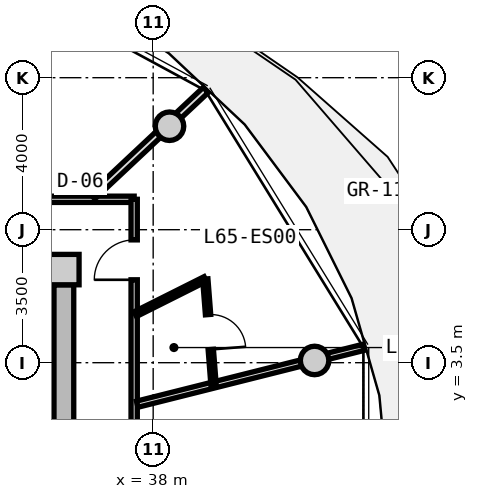
"""IFC4 building model, lengths in metres.
Left out: names, types, materials, properties, quantities, classifications, styles, units other than length and angle.
Written with IfcOpenShell. Run it as: python <this file> out.ifc"""

import sys

from ifc_helpers import new_model, si_unit, direction, frame, frame_2d, origin, origin_2d, place, context, subcontext, project, spatial, rectangle, circle, extrude, source, transform, mapped, element, fill, save


model = new_model("IFC4")
c1 = context("Model", 3, precision=1e-05, world=origin(), true_north=direction((0.0, 1.0)))
c2 = subcontext(c1, "Body", "Model", "MODEL_VIEW")
j1 = project(units=[si_unit("LENGTHUNIT", "METRE"), si_unit("PLANEANGLEUNIT", "RADIAN")], contexts=[c1])
p1 = place(None, origin())
s1 = spatial("IfcSite", under=j1, at=p1, CompositionType="ELEMENT")
p2 = place(p1, origin())
s2 = spatial("IfcBuilding", under=s1, at=p2, CompositionType="ELEMENT")
p3 = place(p2, frame((0.0, 0.0, 210.85)))
s3 = spatial("IfcBuildingStorey", under=s2, at=p3, CompositionType="ELEMENT", Elevation=210.85)
m1 = source(origin(), c2, "Body", "SweptSolid", [
    extrude(rectangle(XDim=0.8, YDim=0.8, at=origin_2d()), origin(), (0.0, 0.0, 1.0), 3.05),
])
p4 = place(p3, frame((35.65, 5.95, 0.0), z_axis=(0.0, 0.0, 1.0), x_axis=(1.0, 0.0, 0.0)))
e1 = element("IfcColumn", 1, at=p4, inside=s3, PredefinedType="COLUMN", context=c2, shape_type="MappedRepresentation", body=[
    mapped(m1, transform((0.0, 0.0, 0.0), x_axis=(1.0, 0.0, 0.0), y_axis=(0.0, 1.0, 0.0), z_axis=(0.0, 0.0, 1.0), scale=1.0)),
])
m2 = source(origin(), c2, "Body", "SweptSolid", [
    extrude(rectangle(XDim=11.1, YDim=0.52, at=frame_2d((5.55, 0.0))), origin(), (0.0, 0.0, 1.0), 2.76),
])
p5 = place(p3, frame((35.65, 5.55, 0.0), z_axis=(0.0, 0.0, 1.0), x_axis=(0.0, -1.0, 0.0)))
e2 = element("IfcWall", 2, at=p5, inside=s3, PredefinedType="SHEAR", context=c2, shape_type="MappedRepresentation", body=[
    mapped(m2, transform((0.0, 0.0, 0.0), x_axis=(1.0, 0.0, 0.0), y_axis=(0.0, 1.0, 0.0), z_axis=(0.0, 0.0, 1.0), scale=1.0)),
])
p6 = place(p5, frame((5.65, 0.0, 0.0)))
e3 = element("IfcOpeningElement", 3, at=p6, cuts=e2, PredefinedType="OPENING", context=c2, shape_type="SweptSolid", body=[
    extrude(rectangle(XDim=1.2, YDim=2.15, at=frame_2d((0.6, 1.075))), frame((0.0, 0.27, 0.0), z_axis=(0.0, -1.0, 0.0), x_axis=(1.0, 0.0, 0.0)), (0.0, 0.0, 1.0), 0.54),
])
p7 = place(p5, frame((9.3, 0.0, 0.0)))
e4 = element("IfcOpeningElement", 4, at=p7, cuts=e2, PredefinedType="OPENING", context=c2, shape_type="SweptSolid", body=[
    extrude(rectangle(XDim=1.0, YDim=2.1, at=frame_2d((0.5, 1.05))), frame((0.0, 0.27, 0.0), z_axis=(0.0, -1.0, 0.0), x_axis=(1.0, 0.0, 0.0)), (0.0, 0.0, 1.0), 0.54),
])
m3 = source(origin(), c2, "Body", "SweptSolid", [
    extrude(circle(Radius=0.375, at=origin_2d()), origin(), (0.0, 0.0, 1.0), 3.05),
])
for number, where, z_axis, x_axis in (
    (5, (42.247, 3.559, 0.0), (0.0, 0.0, 1.0), (1.0, 0.0, 0.0)),
    (6, (38.43, 9.723, 0.0), (0.0, 0.0, 1.0), (1.0, 0.0, 0.0)),
):
    element("IfcColumn", number, at=place(p3, frame(where, z_axis=z_axis, x_axis=x_axis)), inside=s3, PredefinedType="COLUMN", context=c2, shape_type="MappedRepresentation", body=[
        mapped(m3, transform((0.0, 0.0, 0.0), x_axis=(1.0, 0.0, 0.0), y_axis=(0.0, 1.0, 0.0), z_axis=(0.0, 0.0, 1.0), scale=1.0)),
    ])
m4 = source(origin(), c2, "Body", "SweptSolid", [
    extrude(rectangle(XDim=8.58, YDim=0.165, at=frame_2d((4.29, 0.0))), origin(), (0.0, 0.0, 1.0), 2.745),
])
p8 = place(p3, frame((28.92, 7.8, 0.0), z_axis=(0.0, 0.0, 1.0), x_axis=(1.0, 0.0, 0.0)))
e7 = element("IfcWall", 7, at=p8, inside=s3, PredefinedType="PARTITIONING", context=c2, shape_type="MappedRepresentation", body=[
    mapped(m4, transform((0.0, 0.0, 0.0), x_axis=(1.0, 0.0, 0.0), y_axis=(0.0, 1.0, 0.0), z_axis=(0.0, 0.0, 1.0), scale=1.0)),
])
p9 = place(p8, frame((3.802, 0.0, 0.0)))
e8 = element("IfcOpeningElement", 8, at=p9, cuts=e7, PredefinedType="OPENING", context=c2, shape_type="SweptSolid", body=[
    extrude(rectangle(XDim=1.25, YDim=2.2, at=frame_2d((0.625, 1.1))), frame((0.0, 0.093, 0.0), z_axis=(0.0, -1.0, 0.0), x_axis=(1.0, 0.0, 0.0)), (0.0, 0.0, 1.0), 0.185),
])
m5 = source(origin(), c2, "Body", "SweptSolid", [
    extrude(rectangle(XDim=6.88, YDim=0.165, at=frame_2d((3.44, 0.0))), origin(), (0.0, 0.0, 1.0), 2.745),
])
p10 = place(p3, frame((37.5, 7.8, 0.0), z_axis=(0.0, 0.0, 1.0), x_axis=(0.0, -1.0, 0.0)))
e9 = element("IfcWall", 9, at=p10, inside=s3, PredefinedType="PARTITIONING", context=c2, shape_type="MappedRepresentation", body=[
    mapped(m5, transform((0.0, 0.0, 0.0), x_axis=(1.0, 0.0, 0.0), y_axis=(0.0, 1.0, 0.0), z_axis=(0.0, 0.0, 1.0), scale=1.0)),
])
p11 = place(p10, frame((1.068, 0.0, 0.0)))
e10 = element("IfcOpeningElement", 10, at=p11, cuts=e9, PredefinedType="OPENING", context=c2, shape_type="SweptSolid", body=[
    extrude(rectangle(XDim=1.05, YDim=2.15, at=frame_2d((0.525, 1.075))), frame((0.0, 0.093, 0.0), z_axis=(0.0, -1.0, 0.0), x_axis=(1.0, 0.0, 0.0)), (0.0, 0.0, 1.0), 0.185),
])
m6 = source(origin(), c2, "Body", "SweptSolid", [
    extrude(rectangle(XDim=6.157, YDim=0.165, at=frame_2d((3.079, 0.0))), origin(), (0.0, 0.0, 1.0), 2.345),
])
p12 = place(p3, frame((37.58, 2.407, 0.0), z_axis=(0.0, 0.0, 1.0), x_axis=(0.969840867184, 0.243738984038, 0.0)))
e11 = element("IfcWall", 11, at=p12, inside=s3, PredefinedType="PARTITIONING", context=c2, shape_type="MappedRepresentation", body=[
    mapped(m6, transform((0.0, 0.0, 0.0), x_axis=(1.0, 0.0, 0.0), y_axis=(0.0, 1.0, 0.0), z_axis=(0.0, 0.0, 1.0), scale=1.0)),
])
m7 = source(origin(), c2, "Body", "SweptSolid", [
    extrude(rectangle(XDim=4.089, YDim=0.19, at=frame_2d((2.044, 0.0))), origin(), (0.0, 0.0, 1.0), 2.345),
])
p13 = place(p3, frame((36.402, 7.88, 0.0), z_axis=(0.0, 0.0, 1.0), x_axis=(0.729401273609, 0.684086092577, 0.0)))
e12 = element("IfcWall", 12, at=p13, inside=s3, PredefinedType="PARTITIONING", context=c2, shape_type="MappedRepresentation", body=[
    mapped(m7, transform((0.0, 0.0, 0.0), x_axis=(1.0, 0.0, 0.0), y_axis=(0.0, 1.0, 0.0), z_axis=(0.0, 0.0, 1.0), scale=1.0)),
])
m8 = source(origin(), c2, "Body", "SweptSolid", [
    extrude(rectangle(XDim=2.06, YDim=0.14, at=frame_2d((1.03, 0.0))), origin(), (0.0, 0.0, 1.0), 2.745),
])
p14 = place(p3, frame((37.53, 4.778, 0.0), z_axis=(0.0, 0.0, 1.0), x_axis=(0.893952568722, 0.448161583444, 0.0)))
e13 = element("IfcWall", 13, at=p14, inside=s3, PredefinedType="PARTITIONING", context=c2, shape_type="MappedRepresentation", body=[
    mapped(m8, transform((0.0, 0.0, 0.0), x_axis=(1.0, 0.0, 0.0), y_axis=(0.0, 1.0, 0.0), z_axis=(0.0, 0.0, 1.0), scale=1.0)),
])
m9 = source(origin(), c2, "Body", "SweptSolid", [
    extrude(rectangle(XDim=2.798, YDim=0.14, at=frame_2d((1.399, 0.0))), origin(), (0.0, 0.0, 1.0), 2.745),
])
p15 = place(p3, frame((39.371, 5.701, 0.0), z_axis=(0.0, 0.0, 1.0), x_axis=(0.077823984089, -0.996967114553, 0.0)))
e14 = element("IfcWall", 14, at=p15, inside=s3, PredefinedType="PARTITIONING", context=c2, shape_type="MappedRepresentation", body=[
    mapped(m9, transform((0.0, 0.0, 0.0), x_axis=(1.0, 0.0, 0.0), y_axis=(0.0, 1.0, 0.0), z_axis=(0.0, 0.0, 1.0), scale=1.0)),
])
p16 = place(p15, frame((0.939, 0.0, 0.0)))
e15 = element("IfcOpeningElement", 15, at=p16, cuts=e14, PredefinedType="OPENING", context=c2, shape_type="SweptSolid", body=[
    extrude(rectangle(XDim=0.92, YDim=2.1, at=frame_2d((0.46, 1.05))), frame((0.0, 0.08, 0.0), z_axis=(0.0, -1.0, 0.0), x_axis=(1.0, 0.0, 0.0)), (0.0, 0.0, 1.0), 0.16),
])
m10 = source(origin(), c2, "Body", "SweptSolid", [
    extrude(rectangle(XDim=1.05, YDim=2.15, at=frame_2d((0.525, 1.075))), frame((0.0, 0.025, 0.0), z_axis=(0.0, -1.0, 0.0), x_axis=(1.0, 0.0, 0.0)), (0.0, 0.0, 1.0), 0.05),
])
p17 = place(p11, frame((1.05, 0.0, 0.0), z_axis=(0.0, 0.0, 1.0), x_axis=(-1.0, 0.0, 0.0)))
e16 = element("IfcDoor", 16, at=p17, inside=s3, OperationType="SINGLE_SWING_LEFT", PredefinedType="DOOR", context=c2, shape_type="MappedRepresentation", body=[
    mapped(m10, transform((0.0, 0.0, 0.0), x_axis=(1.0, 0.0, 0.0), y_axis=(0.0, 1.0, 0.0), z_axis=(0.0, 0.0, 1.0), scale=1.0)),
])
fill(e10, e16)
m11 = source(origin(), c2, "Body", "SweptSolid", [
    extrude(rectangle(XDim=0.92, YDim=2.1, at=frame_2d((0.46, 1.05))), frame((0.0, 0.025, 0.0), z_axis=(0.0, -1.0, 0.0), x_axis=(1.0, 0.0, 0.0)), (0.0, 0.0, 1.0), 0.05),
])
p18 = place(p16, origin())
e17 = element("IfcDoor", 17, at=p18, inside=s3, OperationType="SINGLE_SWING_RIGHT", PredefinedType="DOOR", context=c2, shape_type="MappedRepresentation", body=[
    mapped(m11, transform((0.0, 0.0, 0.0), x_axis=(1.0, 0.0, 0.0), y_axis=(0.0, 1.0, 0.0), z_axis=(0.0, 0.0, 1.0), scale=1.0)),
])
fill(e15, e17)
save(model, sys.argv[1])
